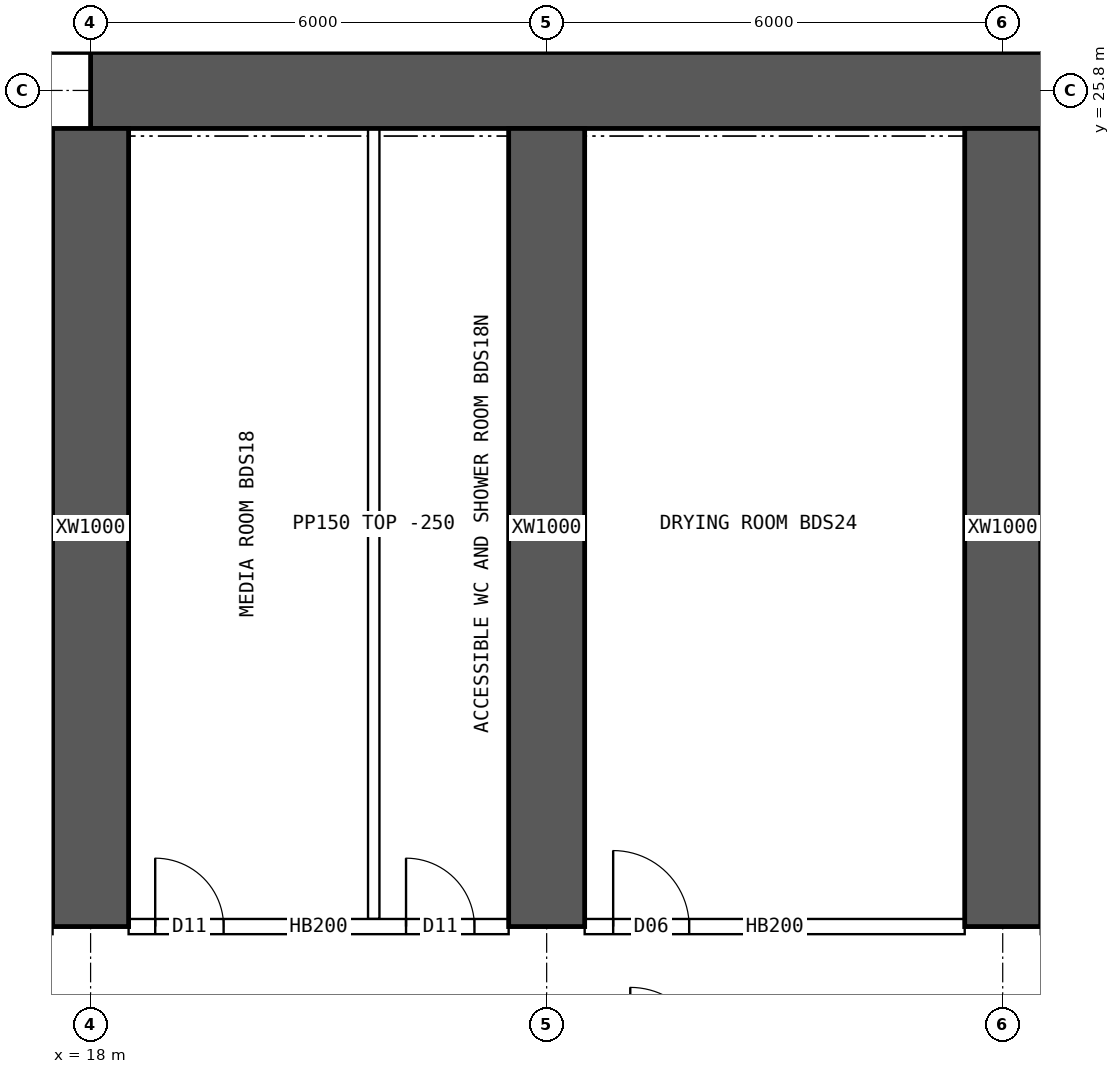
"""IFC4 building model, lengths in metres.
Left out: names, types, materials, properties, quantities, classifications, styles, units other than length and angle.
Written with IfcOpenShell. Run it as: python <this file> out.ifc"""

import sys

from ifc_helpers import new_model, si_unit, direction, frame, frame_2d, origin, place, context, subcontext, project, spatial, rectangle, extrude, element, fill, save


model = new_model("IFC4")
c1 = context("Model", 3, precision=1e-05, world=origin(), true_north=direction((0.0, 1.0)))
c2 = subcontext(c1, "Body", "Model", "MODEL_VIEW")
j1 = project(units=[si_unit("LENGTHUNIT", "METRE"), si_unit("PLANEANGLEUNIT", "RADIAN")], contexts=[c1])
p1 = place(None, origin())
s1 = spatial("IfcSite", under=j1, at=p1, CompositionType="ELEMENT")
p2 = place(p1, origin())
s2 = spatial("IfcBuilding", under=s1, at=p2, CompositionType="ELEMENT")
p3 = place(p2, frame((0.0, 0.0, 23.95)))
s3 = spatial("IfcBuildingStorey", under=s2, at=p3, CompositionType="ELEMENT", Elevation=23.95)
p4 = place(p3, frame((18.0, 25.8, 0.0), z_axis=(0.0, 0.0, 1.0), x_axis=(1.0, 0.0, 0.0)))
e1 = element("IfcWall", 1, at=p4, inside=s3, PredefinedType="SHEAR", context=c2, shape_type="SweptSolid", body=[
    extrude(rectangle(XDim=48.0, YDim=1.0, at=frame_2d((24.0, 0.0))), origin(), (0.0, 0.0, 1.0), 3.75),
])
for number, where, z_axis, x_axis in (
    (2, (18.0, 14.8, 0.0), (0.0, 0.0, 1.0), (0.0, 1.0, 0.0)),
    (3, (24.0, 14.8, 0.0), (0.0, 0.0, 1.0), (0.0, 1.0, 0.0)),
    (4, (30.0, 14.8, 0.0), (0.0, 0.0, 1.0), (0.0, 1.0, 0.0)),
):
    element("IfcWall", number, at=place(p3, frame(where, z_axis=z_axis, x_axis=x_axis)), inside=s3, PredefinedType="SHEAR", context=c2, shape_type="SweptSolid", body=[
        extrude(rectangle(XDim=10.5, YDim=1.0, at=frame_2d((5.25, 0.0))), origin(), (0.0, 0.0, 1.0), 3.75),
    ])
p5 = place(p3, frame((18.5, 14.8, 0.0), z_axis=(0.0, 0.0, 1.0), x_axis=(1.0, 0.0, 0.0)))
e5 = element("IfcWall", 5, at=p5, inside=s3, PredefinedType="SOLIDWALL", context=c2, shape_type="SweptSolid", body=[
    extrude(rectangle(XDim=5.0, YDim=0.2, at=frame_2d((2.5, 0.0))), origin(), (0.0, 0.0, 1.0), 3.5),
])
p6 = place(p5, frame((0.35, 0.0, 0.0)))
e6 = element("IfcOpeningElement", 6, at=p6, cuts=e5, PredefinedType="OPENING", context=c2, shape_type="SweptSolid", body=[
    extrude(rectangle(XDim=0.9, YDim=2.1, at=frame_2d((0.45, 1.05))), frame((0.0, 0.11, 0.0), z_axis=(0.0, -1.0, 0.0), x_axis=(1.0, 0.0, 0.0)), (0.0, 0.0, 1.0), 0.22),
])
p7 = place(p5, frame((3.65, 0.0, 0.0)))
e7 = element("IfcOpeningElement", 7, at=p7, cuts=e5, PredefinedType="OPENING", context=c2, shape_type="SweptSolid", body=[
    extrude(rectangle(XDim=0.9, YDim=2.1, at=frame_2d((0.45, 1.05))), frame((0.0, 0.11, 0.0), z_axis=(0.0, -1.0, 0.0), x_axis=(1.0, 0.0, 0.0)), (0.0, 0.0, 1.0), 0.22),
])
p8 = place(p3, frame((24.5, 14.8, 0.0), z_axis=(0.0, 0.0, 1.0), x_axis=(1.0, 0.0, 0.0)))
e8 = element("IfcWall", 8, at=p8, inside=s3, PredefinedType="SOLIDWALL", context=c2, shape_type="SweptSolid", body=[
    extrude(rectangle(XDim=5.0, YDim=0.2, at=frame_2d((2.5, 0.0))), origin(), (0.0, 0.0, 1.0), 3.5),
])
p9 = place(p8, frame((0.375, 0.0, 0.0)))
e9 = element("IfcOpeningElement", 9, at=p9, cuts=e8, PredefinedType="OPENING", context=c2, shape_type="SweptSolid", body=[
    extrude(rectangle(XDim=1.0, YDim=2.1, at=frame_2d((0.5, 1.05))), frame((0.0, 0.11, 0.0), z_axis=(0.0, -1.0, 0.0), x_axis=(1.0, 0.0, 0.0)), (0.0, 0.0, 1.0), 0.22),
])
p10 = place(p3, frame((21.725, 14.9, 0.0), z_axis=(0.0, 0.0, 1.0), x_axis=(0.0, 1.0, 0.0)))
e10 = element("IfcWall", 10, at=p10, inside=s3, PredefinedType="PARTITIONING", context=c2, shape_type="SweptSolid", body=[
    extrude(rectangle(XDim=10.4, YDim=0.15, at=frame_2d((5.2, 0.0))), origin(), (0.0, 0.0, 1.0), 3.5),
])
p11 = place(p6, origin())
e11 = element("IfcDoor", 11, at=p11, inside=s3, OperationType="SINGLE_SWING_LEFT", PredefinedType="DOOR", context=c2, shape_type="SweptSolid", body=[
    extrude(rectangle(XDim=0.9, YDim=2.1, at=frame_2d((0.45, 1.05))), frame((0.0, 0.025, 0.0), z_axis=(0.0, -1.0, 0.0), x_axis=(1.0, 0.0, 0.0)), (0.0, 0.0, 1.0), 0.05),
])
fill(e6, e11)
p12 = place(p7, origin())
e12 = element("IfcDoor", 12, at=p12, inside=s3, OperationType="SINGLE_SWING_LEFT", PredefinedType="DOOR", context=c2, shape_type="SweptSolid", body=[
    extrude(rectangle(XDim=0.9, YDim=2.1, at=frame_2d((0.45, 1.05))), frame((0.0, 0.025, 0.0), z_axis=(0.0, -1.0, 0.0), x_axis=(1.0, 0.0, 0.0)), (0.0, 0.0, 1.0), 0.05),
])
fill(e7, e12)
p13 = place(p9, origin())
e13 = element("IfcDoor", 13, at=p13, inside=s3, OperationType="SINGLE_SWING_LEFT", PredefinedType="DOOR", context=c2, shape_type="SweptSolid", body=[
    extrude(rectangle(XDim=1.0, YDim=2.1, at=frame_2d((0.5, 1.05))), frame((0.0, 0.025, 0.0), z_axis=(0.0, -1.0, 0.0), x_axis=(1.0, 0.0, 0.0)), (0.0, 0.0, 1.0), 0.05),
])
fill(e9, e13)
save(model, sys.argv[1])
